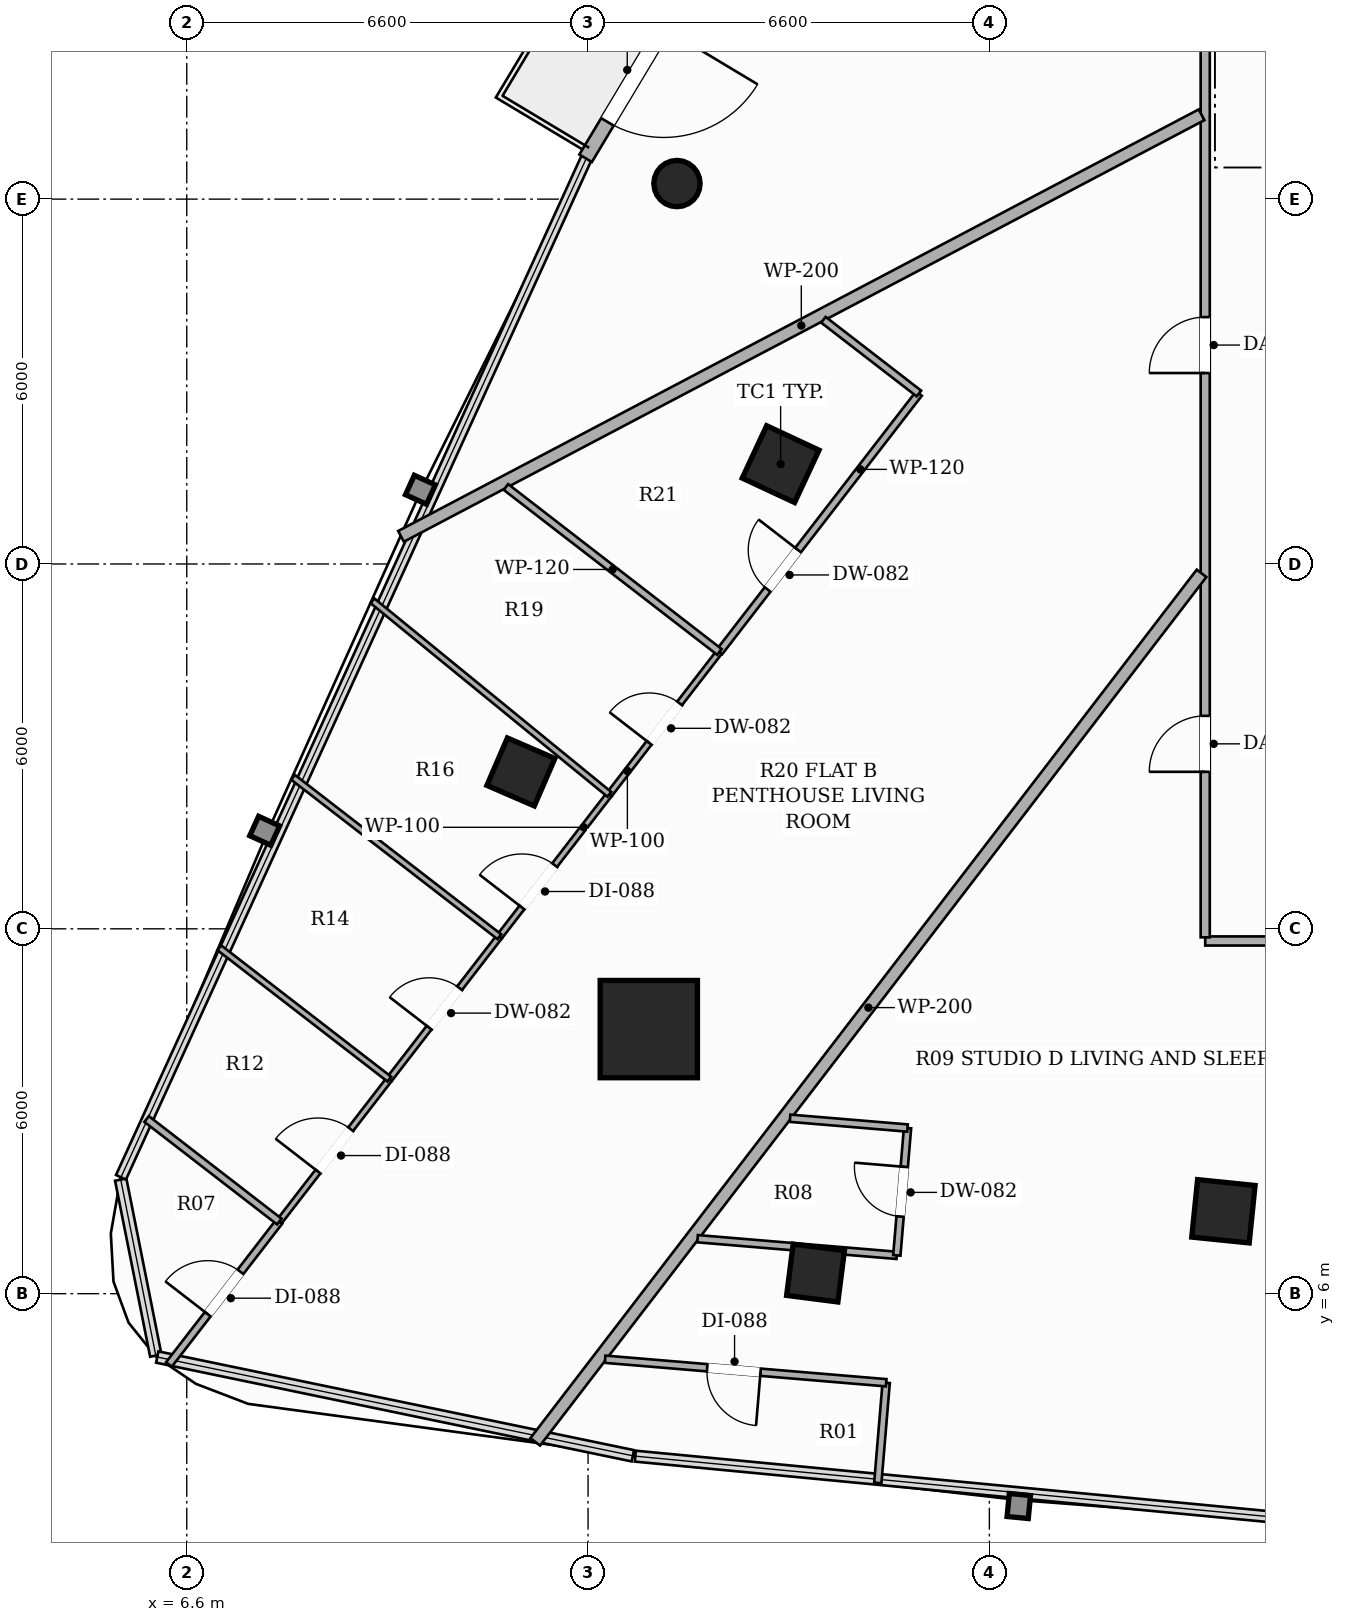
"""IFC4 building model, lengths in metres.
Left out: names, types, materials, properties, quantities, classifications, styles, units other than length and angle.
Written with IfcOpenShell. Run it as: python <this file> out.ifc"""

import sys

from ifc_helpers import new_model, si_unit, direction, frame, frame_2d, origin, origin_2d, place, context, subcontext, project, spatial, rectangle, hollow_rectangle, hollow_circle, extrude, element, fill, save


model = new_model("IFC4")
c1 = context("Model", 3, precision=1e-05, world=origin(), true_north=direction((0.0, 1.0)))
c2 = subcontext(c1, "Body", "Model", "MODEL_VIEW")
j1 = project(units=[si_unit("LENGTHUNIT", "METRE"), si_unit("PLANEANGLEUNIT", "RADIAN")], contexts=[c1])
p1 = place(None, origin())
s1 = spatial("IfcSite", under=j1, at=p1, CompositionType="ELEMENT")
p2 = place(p1, origin())
s2 = spatial("IfcBuilding", under=s1, at=p2, CompositionType="ELEMENT")
p3 = place(p2, frame((0.0, 0.0, 74.15)))
s3 = spatial("IfcBuildingStorey", under=s2, at=p3, CompositionType="ELEMENT", Elevation=74.15)
p4 = place(p3, frame((14.199, 10.351, 0.0), z_axis=(0.0, 0.0, 1.0), x_axis=(1.0, 0.0, 0.0)))
e1 = element("IfcColumn", 1, at=p4, inside=s3, PredefinedType="COLUMN", context=c2, shape_type="SweptSolid", body=[
    extrude(hollow_rectangle(XDim=1.6, YDim=1.6, WallThickness=0.05, at=origin_2d()), origin(), (0.0, 0.0, 1.0), 3.3),
])
for number, where, z_axis, x_axis in (
    (2, (16.367, 19.642, 0.0), (0.0, 0.0, 1.0), (0.423, 0.906, 0.0)),
    (3, (23.649, 7.355, 0.0), (0.0, 0.0, 1.0), (-0.995, 0.101, 0.0)),
):
    element("IfcColumn", number, at=place(p3, frame(where, z_axis=z_axis, x_axis=x_axis)), inside=s3, PredefinedType="COLUMN", context=c2, shape_type="SweptSolid", body=[
        extrude(hollow_rectangle(XDim=0.95, YDim=0.95, WallThickness=0.032, at=origin_2d()), origin(), (0.0, 0.0, 1.0), 3.3),
    ])
for number, where, z_axis, x_axis in (
    (4, (12.095, 14.58, 0.0), (0.0, 0.0, 1.0), (0.397, 0.918, 0.0)),
    (5, (16.941, 6.339, 0.0), (0.0, 0.0, 1.0), (-0.992, 0.127, 0.0)),
):
    element("IfcColumn", number, at=place(p3, frame(where, z_axis=z_axis, x_axis=x_axis)), inside=s3, PredefinedType="COLUMN", context=c2, shape_type="SweptSolid", body=[
        extrude(hollow_rectangle(XDim=0.85, YDim=0.85, WallThickness=0.028, at=origin_2d()), origin(), (0.0, 0.0, 1.0), 3.3),
    ])
p5 = place(p3, frame((14.662, 24.256, 0.0), z_axis=(0.0, 0.0, 1.0), x_axis=(1.0, 0.0, 0.0)))
e6 = element("IfcColumn", 6, at=p5, inside=s3, PredefinedType="COLUMN", context=c2, shape_type="SweptSolid", body=[
    extrude(hollow_circle(Radius=0.381, WallThickness=0.022, at=origin_2d()), origin(), (0.0, 0.0, 1.0), 3.3),
])
p6 = place(p3, frame((19.576, 35.37, 0.0), z_axis=(0.0, 0.0, 1.0), x_axis=(-0.514331693128, -0.85759134175, 0.0)))
e7 = element("IfcWall", 7, at=p6, inside=s3, PredefinedType="SOLIDWALL", context=c2, shape_type="SweptSolid", body=[
    extrude(rectangle(XDim=12.474, YDim=0.24, at=frame_2d((6.237, 0.0))), origin(), (0.0, 0.0, 1.0), 2.624),
])
p7 = place(p6, frame((9.977, 0.0, 0.0)))
e8 = element("IfcOpeningElement", 8, at=p7, cuts=e7, PredefinedType="OPENING", context=c2, shape_type="SweptSolid", body=[
    extrude(rectangle(XDim=1.8, YDim=2.2, at=frame_2d((0.9, 1.1))), frame((0.0, 0.13, 0.0), z_axis=(0.0, -1.0, 0.0), x_axis=(1.0, 0.0, 0.0)), (0.0, 0.0, 1.0), 0.26),
])
p8 = place(p3, frame((42.59, 11.8, 0.0), z_axis=(0.0, 0.0, 1.0), x_axis=(-1.0, 0.0, 0.0)))
e9 = element("IfcWall", 9, at=p8, inside=s3, PredefinedType="PARTITIONING", context=c2, shape_type="SweptSolid", body=[
    extrude(rectangle(XDim=19.24, YDim=0.15, at=frame_2d((9.62, 0.0))), origin(), (0.0, 0.0, 1.0), 2.669),
])
p9 = place(p8, frame((9.24, 0.0, 0.0)))
e10 = element("IfcOpeningElement", 10, at=p9, cuts=e9, PredefinedType="OPENING", context=c2, shape_type="SweptSolid", body=[
    extrude(rectangle(XDim=0.88, YDim=2.1, at=frame_2d((0.44, 1.05))), frame((0.0, 0.085, 0.0), z_axis=(0.0, -1.0, 0.0), x_axis=(1.0, 0.0, 0.0)), (0.0, 0.0, 1.0), 0.17),
])
p10 = place(p8, frame((2.174, 0.0, 0.0)))
e11 = element("IfcOpeningElement", 11, at=p10, cuts=e9, PredefinedType="OPENING", context=c2, shape_type="SweptSolid", body=[
    extrude(rectangle(XDim=0.88, YDim=2.1, at=frame_2d((0.44, 1.05))), frame((0.0, 0.085, 0.0), z_axis=(0.0, -1.0, 0.0), x_axis=(1.0, 0.0, 0.0)), (0.0, 0.0, 1.0), 0.17),
])
p11 = place(p3, frame((23.35, 11.86, 0.0), z_axis=(0.0, 0.0, 1.0), x_axis=(0.0, 1.0, 0.0)))
e12 = element("IfcWall", 12, at=p11, inside=s3, PredefinedType="PARTITIONING", context=c2, shape_type="SweptSolid", body=[
    extrude(rectangle(XDim=25.04, YDim=0.15, at=frame_2d((12.52, 0.0))), origin(), (0.0, 0.0, 1.0), 2.413),
])
p12 = place(p11, frame((18.695, 0.0, 0.0)))
e13 = element("IfcOpeningElement", 13, at=p12, cuts=e12, PredefinedType="OPENING", context=c2, shape_type="SweptSolid", body=[
    extrude(rectangle(XDim=0.88, YDim=2.1, at=frame_2d((0.44, 1.05))), frame((0.0, 0.085, 0.0), z_axis=(0.0, -1.0, 0.0), x_axis=(1.0, 0.0, 0.0)), (0.0, 0.0, 1.0), 0.17),
])
p13 = place(p11, frame((9.28, 0.0, 0.0)))
e14 = element("IfcOpeningElement", 14, at=p13, cuts=e12, PredefinedType="OPENING", context=c2, shape_type="SweptSolid", body=[
    extrude(rectangle(XDim=0.92, YDim=2.15, at=frame_2d((0.46, 1.075))), frame((0.0, 0.085, 0.0), z_axis=(0.0, -1.0, 0.0), x_axis=(1.0, 0.0, 0.0)), (0.0, 0.0, 1.0), 0.17),
])
p14 = place(p11, frame((2.722, 0.0, 0.0)))
e15 = element("IfcOpeningElement", 15, at=p14, cuts=e12, PredefinedType="OPENING", context=c2, shape_type="SweptSolid", body=[
    extrude(rectangle(XDim=0.92, YDim=2.15, at=frame_2d((0.46, 1.075))), frame((0.0, 0.085, 0.0), z_axis=(0.0, -1.0, 0.0), x_axis=(1.0, 0.0, 0.0)), (0.0, 0.0, 1.0), 0.17),
])
p15 = place(p3, frame((23.29, 25.387, 0.0), z_axis=(0.0, 0.0, 1.0), x_axis=(-0.884824599801, -0.465924272373, 0.0)))
e16 = element("IfcWall", 16, at=p15, inside=s3, PredefinedType="PARTITIONING", context=c2, shape_type="SweptSolid", body=[
    extrude(rectangle(XDim=14.88, YDim=0.2, at=frame_2d((7.44, 0.0))), origin(), (0.0, 0.0, 1.0), 2.413),
])
p16 = place(p3, frame((23.29, 17.846, 0.0), z_axis=(0.0, 0.0, 1.0), x_axis=(-0.608736412859, -0.793372535232, 0.0)))
e17 = element("IfcWall", 17, at=p16, inside=s3, PredefinedType="PARTITIONING", context=c2, shape_type="SweptSolid", body=[
    extrude(rectangle(XDim=18.003, YDim=0.2, at=frame_2d((9.001, 0.0))), origin(), (0.0, 0.0, 1.0), 2.413),
])
p17 = place(p3, frame((15.36, 16.554, 0.0), z_axis=(0.0, 0.0, 1.0), x_axis=(0.611289599194, 0.791406991324, 0.0)))
e18 = element("IfcWall", 18, at=p17, inside=s3, PredefinedType="PARTITIONING", context=c2, shape_type="SweptSolid", body=[
    extrude(rectangle(XDim=5.369, YDim=0.12, at=frame_2d((2.685, 0.0))), origin(), (0.0, 0.0, 1.0), 2.669),
])
p18 = place(p17, frame((1.297, 0.0, 0.0)))
e19 = element("IfcOpeningElement", 19, at=p18, cuts=e18, PredefinedType="OPENING", context=c2, shape_type="SweptSolid", body=[
    extrude(rectangle(XDim=0.82, YDim=2.1, at=frame_2d((0.41, 1.05))), frame((0.0, 0.07, 0.0), z_axis=(0.0, -1.0, 0.0), x_axis=(1.0, 0.0, 0.0)), (0.0, 0.0, 1.0), 0.14),
])
p19 = place(p3, frame((18.642, 20.803, 0.0), z_axis=(0.0, 0.0, 1.0), x_axis=(-0.791493240875, 0.611177919799, 0.0)))
e20 = element("IfcWall", 20, at=p19, inside=s3, PredefinedType="PARTITIONING", context=c2, shape_type="SweptSolid", body=[
    extrude(rectangle(XDim=1.985, YDim=0.12, at=frame_2d((0.992, 0.0))), origin(), (0.0, 0.0, 1.0), 2.669),
])
p20 = place(p3, frame((6.307, 4.836, 0.0), z_axis=(0.0, 0.0, 1.0), x_axis=(0.611279012709, 0.791415168304, 0.0)))
e21 = element("IfcWall", 21, at=p20, inside=s3, PredefinedType="PARTITIONING", context=c2, shape_type="SweptSolid", body=[
    extrude(rectangle(XDim=2.969, YDim=0.12, at=frame_2d((1.485, 0.0))), origin(), (0.0, 0.0, 1.0), 3.06),
])
p21 = place(p20, frame((1.045, 0.0, 0.0)))
e22 = element("IfcOpeningElement", 22, at=p21, cuts=e21, PredefinedType="OPENING", context=c2, shape_type="SweptSolid", body=[
    extrude(rectangle(XDim=0.88, YDim=2.1, at=frame_2d((0.44, 1.05))), frame((0.0, 0.07, 0.0), z_axis=(0.0, -1.0, 0.0), x_axis=(1.0, 0.0, 0.0)), (0.0, 0.0, 1.0), 0.14),
])
p22 = place(p3, frame((11.741, 11.87, 0.0), z_axis=(0.0, 0.0, 1.0), x_axis=(0.61134418085, 0.791364828976, 0.0)))
e23 = element("IfcWall", 23, at=p22, inside=s3, PredefinedType="PARTITIONING", context=c2, shape_type="SweptSolid", body=[
    extrude(rectangle(XDim=2.959, YDim=0.1, at=frame_2d((1.479, 0.0))), origin(), (0.0, 0.0, 1.0), 2.413),
])
p23 = place(p22, frame((0.608, 0.0, 0.0)))
e24 = element("IfcOpeningElement", 24, at=p23, cuts=e23, PredefinedType="OPENING", context=c2, shape_type="SweptSolid", body=[
    extrude(rectangle(XDim=0.88, YDim=2.1, at=frame_2d((0.44, 1.05))), frame((0.0, 0.06, 0.0), z_axis=(0.0, -1.0, 0.0), x_axis=(1.0, 0.0, 0.0)), (0.0, 0.0, 1.0), 0.12),
])
p24 = place(p3, frame((13.55, 14.212, 0.0), z_axis=(0.0, 0.0, 1.0), x_axis=(0.611510880037, 0.791236022686, 0.0)))
e25 = element("IfcWall", 25, at=p24, inside=s3, PredefinedType="PARTITIONING", context=c2, shape_type="SweptSolid", body=[
    extrude(rectangle(XDim=2.96, YDim=0.1, at=frame_2d((1.48, 0.0))), origin(), (0.0, 0.0, 1.0), 3.06),
])
p25 = place(p24, frame((1.07, 0.0, 0.0)))
e26 = element("IfcOpeningElement", 26, at=p25, cuts=e25, PredefinedType="OPENING", context=c2, shape_type="SweptSolid", body=[
    extrude(rectangle(XDim=0.82, YDim=2.1, at=frame_2d((0.41, 1.05))), frame((0.0, 0.06, 0.0), z_axis=(0.0, -1.0, 0.0), x_axis=(1.0, 0.0, 0.0)), (0.0, 0.0, 1.0), 0.12),
])
p26 = place(p3, frame((9.932, 9.528, 0.0), z_axis=(0.0, 0.0, 1.0), x_axis=(0.611304268233, 0.791395660615, 0.0)))
e27 = element("IfcWall", 27, at=p26, inside=s3, PredefinedType="PARTITIONING", context=c2, shape_type="SweptSolid", body=[
    extrude(rectangle(XDim=2.959, YDim=0.1, at=frame_2d((1.48, 0.0))), origin(), (0.0, 0.0, 1.0), 2.619),
])
p27 = place(p26, frame((1.07, 0.0, 0.0)))
e28 = element("IfcOpeningElement", 28, at=p27, cuts=e27, PredefinedType="OPENING", context=c2, shape_type="SweptSolid", body=[
    extrude(rectangle(XDim=0.82, YDim=2.1, at=frame_2d((0.41, 1.05))), frame((0.0, 0.06, 0.0), z_axis=(0.0, -1.0, 0.0), x_axis=(1.0, 0.0, 0.0)), (0.0, 0.0, 1.0), 0.12),
])
p28 = place(p3, frame((8.122, 7.186, 0.0), z_axis=(0.0, 0.0, 1.0), x_axis=(0.611459238808, 0.791275931187, 0.0)))
e29 = element("IfcWall", 29, at=p28, inside=s3, PredefinedType="PARTITIONING", context=c2, shape_type="SweptSolid", body=[
    extrude(rectangle(XDim=2.96, YDim=0.1, at=frame_2d((1.48, 0.0))), origin(), (0.0, 0.0, 1.0), 3.06),
])
p29 = place(p28, frame((1.04, 0.0, 0.0)))
e30 = element("IfcOpeningElement", 30, at=p29, cuts=e29, PredefinedType="OPENING", context=c2, shape_type="SweptSolid", body=[
    extrude(rectangle(XDim=0.88, YDim=2.1, at=frame_2d((0.44, 1.05))), frame((0.0, 0.06, 0.0), z_axis=(0.0, -1.0, 0.0), x_axis=(1.0, 0.0, 0.0)), (0.0, 0.0, 1.0), 0.12),
])
p30 = place(p3, frame((15.36, 16.554, 0.0), z_axis=(0.0, 0.0, 1.0), x_axis=(-0.79138059941, 0.611323766, 0.0)))
e31 = element("IfcWall", 31, at=p30, inside=s3, PredefinedType="PARTITIONING", context=c2, shape_type="SweptSolid", body=[
    extrude(rectangle(XDim=4.437, YDim=0.12, at=frame_2d((2.218, 0.0))), origin(), (0.0, 0.0, 1.0), 2.413),
])
p31 = place(p3, frame((5.94, 8.872, 0.0), z_axis=(0.0, 0.0, 1.0), x_axis=(0.791312259297, -0.611412224514, 0.0)))
e32 = element("IfcWall", 32, at=p31, inside=s3, PredefinedType="PARTITIONING", context=c2, shape_type="SweptSolid", body=[
    extrude(rectangle(XDim=2.758, YDim=0.12, at=frame_2d((1.379, 0.0))), origin(), (0.0, 0.0, 1.0), 3.06),
])
p32 = place(p3, frame((9.654, 17.394, 0.0), z_axis=(0.0, 0.0, 1.0), x_axis=(0.774493289837, -0.63258212431, 0.0)))
e33 = element("IfcWall", 33, at=p32, inside=s3, PredefinedType="PARTITIONING", context=c2, shape_type="SweptSolid", body=[
    extrude(rectangle(XDim=5.03, YDim=0.1, at=frame_2d((2.515, 0.0))), origin(), (0.0, 0.0, 1.0), 2.413),
])
p33 = place(p3, frame((11.741, 11.87, 0.0), z_axis=(0.0, 0.0, 1.0), x_axis=(-0.791298779838, 0.61142966973, 0.0)))
e34 = element("IfcWall", 34, at=p33, inside=s3, PredefinedType="PARTITIONING", context=c2, shape_type="SweptSolid", body=[
    extrude(rectangle(XDim=4.286, YDim=0.1, at=frame_2d((2.143, 0.0))), origin(), (0.0, 0.0, 1.0), 3.06),
])
p34 = place(p3, frame((9.932, 9.528, 0.0), z_axis=(0.0, 0.0, 1.0), x_axis=(-0.791360981132, 0.611349161725, 0.0)))
e35 = element("IfcWall", 35, at=p34, inside=s3, PredefinedType="PARTITIONING", context=c2, shape_type="SweptSolid", body=[
    extrude(rectangle(XDim=3.533, YDim=0.1, at=frame_2d((1.767, 0.0))), origin(), (0.0, 0.0, 1.0), 3.06),
])
p35 = place(p3, frame((15.001, 6.904, 0.0), z_axis=(0.0, 0.0, 1.0), x_axis=(0.996518569178, -0.083371105803, 0.0)))
e36 = element("IfcWall", 36, at=p35, inside=s3, PredefinedType="PARTITIONING", context=c2, shape_type="SweptSolid", body=[
    extrude(rectangle(XDim=3.289, YDim=0.12, at=frame_2d((1.644, 0.0))), origin(), (0.0, 0.0, 1.0), 2.413),
])
p36 = place(p3, frame((18.278, 6.63, 0.0), z_axis=(0.0, 0.0, 1.0), x_axis=(0.083756885487, 0.996486218737, 0.0)))
e37 = element("IfcWall", 37, at=p36, inside=s3, PredefinedType="PARTITIONING", context=c2, shape_type="SweptSolid", body=[
    extrude(rectangle(XDim=2.102, YDim=0.12, at=frame_2d((1.051, 0.0))), origin(), (0.0, 0.0, 1.0), 2.413),
])
p37 = place(p36, frame((0.641, 0.0, 0.0)))
e38 = element("IfcOpeningElement", 38, at=p37, cuts=e37, PredefinedType="OPENING", context=c2, shape_type="SweptSolid", body=[
    extrude(rectangle(XDim=0.82, YDim=2.1, at=frame_2d((0.41, 1.05))), frame((0.0, 0.07, 0.0), z_axis=(0.0, -1.0, 0.0), x_axis=(1.0, 0.0, 0.0)), (0.0, 0.0, 1.0), 0.14),
])
p38 = place(p3, frame((18.454, 8.724, 0.0), z_axis=(0.0, 0.0, 1.0), x_axis=(-0.996550966871, 0.082982952637, 0.0)))
e39 = element("IfcWall", 39, at=p38, inside=s3, PredefinedType="PARTITIONING", context=c2, shape_type="SweptSolid", body=[
    extrude(rectangle(XDim=1.939, YDim=0.12, at=frame_2d((0.969, 0.0))), origin(), (0.0, 0.0, 1.0), 2.669),
])
p39 = place(p3, frame((17.965, 2.887, 0.0), z_axis=(0.0, 0.0, 1.0), x_axis=(0.083412008543, 0.996515146313, 0.0)))
e40 = element("IfcWall", 40, at=p39, inside=s3, PredefinedType="PARTITIONING", context=c2, shape_type="SweptSolid", body=[
    extrude(rectangle(XDim=1.654, YDim=0.12, at=frame_2d((0.827, 0.0))), origin(), (0.0, 0.0, 1.0), 2.619),
])
p40 = place(p3, frame((18.103, 4.535, 0.0), z_axis=(0.0, 0.0, 1.0), x_axis=(-0.99650936218, 0.083481082211, 0.0)))
e41 = element("IfcWall", 41, at=p40, inside=s3, PredefinedType="PARTITIONING", context=c2, shape_type="SweptSolid", body=[
    extrude(rectangle(XDim=4.638, YDim=0.12, at=frame_2d((2.319, 0.0))), origin(), (0.0, 0.0, 1.0), 2.619),
])
p41 = place(p40, frame((2.074, 0.0, 0.0)))
e42 = element("IfcOpeningElement", 42, at=p41, cuts=e41, PredefinedType="OPENING", context=c2, shape_type="SweptSolid", body=[
    extrude(rectangle(XDim=0.88, YDim=2.1, at=frame_2d((0.44, 1.05))), frame((0.0, 0.07, 0.0), z_axis=(0.0, -1.0, 0.0), x_axis=(1.0, 0.0, 0.0)), (0.0, 0.0, 1.0), 0.14),
])
p42 = place(p7, origin())
e43 = element("IfcDoor", 43, at=p42, inside=s3, OperationType="SINGLE_SWING_LEFT", PredefinedType="DOOR", context=c2, shape_type="SweptSolid", body=[
    extrude(rectangle(XDim=1.8, YDim=2.2, at=frame_2d((0.9, 1.1))), frame((0.0, 0.025, 0.0), z_axis=(0.0, -1.0, 0.0), x_axis=(1.0, 0.0, 0.0)), (0.0, 0.0, 1.0), 0.05),
])
fill(e8, e43)
p43 = place(p13, origin())
e44 = element("IfcDoor", 44, at=p43, inside=s3, OperationType="SINGLE_SWING_LEFT", PredefinedType="DOOR", context=c2, shape_type="SweptSolid", body=[
    extrude(rectangle(XDim=0.92, YDim=2.15, at=frame_2d((0.46, 1.075))), frame((0.0, 0.025, 0.0), z_axis=(0.0, -1.0, 0.0), x_axis=(1.0, 0.0, 0.0)), (0.0, 0.0, 1.0), 0.05),
])
fill(e14, e44)
p44 = place(p18, origin())
e45 = element("IfcDoor", 45, at=p44, inside=s3, OperationType="SINGLE_SWING_RIGHT", PredefinedType="DOOR", context=c2, shape_type="SweptSolid", body=[
    extrude(rectangle(XDim=0.82, YDim=2.1, at=frame_2d((0.41, 1.05))), frame((0.0, 0.025, 0.0), z_axis=(0.0, -1.0, 0.0), x_axis=(1.0, 0.0, 0.0)), (0.0, 0.0, 1.0), 0.05),
])
fill(e19, e45)
p45 = place(p21, origin())
e46 = element("IfcDoor", 46, at=p45, inside=s3, OperationType="SINGLE_SWING_LEFT", PredefinedType="DOOR", context=c2, shape_type="SweptSolid", body=[
    extrude(rectangle(XDim=0.88, YDim=2.1, at=frame_2d((0.44, 1.05))), frame((0.0, 0.025, 0.0), z_axis=(0.0, -1.0, 0.0), x_axis=(1.0, 0.0, 0.0)), (0.0, 0.0, 1.0), 0.05),
])
fill(e22, e46)
p46 = place(p23, origin())
e47 = element("IfcDoor", 47, at=p46, inside=s3, OperationType="SINGLE_SWING_LEFT", PredefinedType="DOOR", context=c2, shape_type="SweptSolid", body=[
    extrude(rectangle(XDim=0.88, YDim=2.1, at=frame_2d((0.44, 1.05))), frame((0.0, 0.025, 0.0), z_axis=(0.0, -1.0, 0.0), x_axis=(1.0, 0.0, 0.0)), (0.0, 0.0, 1.0), 0.05),
])
fill(e24, e47)
p47 = place(p25, origin())
e48 = element("IfcDoor", 48, at=p47, inside=s3, OperationType="SINGLE_SWING_LEFT", PredefinedType="DOOR", context=c2, shape_type="SweptSolid", body=[
    extrude(rectangle(XDim=0.82, YDim=2.1, at=frame_2d((0.41, 1.05))), frame((0.0, 0.025, 0.0), z_axis=(0.0, -1.0, 0.0), x_axis=(1.0, 0.0, 0.0)), (0.0, 0.0, 1.0), 0.05),
])
fill(e26, e48)
p48 = place(p27, origin())
e49 = element("IfcDoor", 49, at=p48, inside=s3, OperationType="SINGLE_SWING_LEFT", PredefinedType="DOOR", context=c2, shape_type="SweptSolid", body=[
    extrude(rectangle(XDim=0.82, YDim=2.1, at=frame_2d((0.41, 1.05))), frame((0.0, 0.025, 0.0), z_axis=(0.0, -1.0, 0.0), x_axis=(1.0, 0.0, 0.0)), (0.0, 0.0, 1.0), 0.05),
])
fill(e28, e49)
p49 = place(p29, origin())
e50 = element("IfcDoor", 50, at=p49, inside=s3, OperationType="SINGLE_SWING_LEFT", PredefinedType="DOOR", context=c2, shape_type="SweptSolid", body=[
    extrude(rectangle(XDim=0.88, YDim=2.1, at=frame_2d((0.44, 1.05))), frame((0.0, 0.025, 0.0), z_axis=(0.0, -1.0, 0.0), x_axis=(1.0, 0.0, 0.0)), (0.0, 0.0, 1.0), 0.05),
])
fill(e30, e50)
p50 = place(p14, origin())
e51 = element("IfcDoor", 51, at=p50, inside=s3, OperationType="SINGLE_SWING_LEFT", PredefinedType="DOOR", context=c2, shape_type="SweptSolid", body=[
    extrude(rectangle(XDim=0.92, YDim=2.15, at=frame_2d((0.46, 1.075))), frame((0.0, 0.025, 0.0), z_axis=(0.0, -1.0, 0.0), x_axis=(1.0, 0.0, 0.0)), (0.0, 0.0, 1.0), 0.05),
])
fill(e15, e51)
p51 = place(p37, origin())
e52 = element("IfcDoor", 52, at=p51, inside=s3, OperationType="SINGLE_SWING_RIGHT", PredefinedType="DOOR", context=c2, shape_type="SweptSolid", body=[
    extrude(rectangle(XDim=0.82, YDim=2.1, at=frame_2d((0.41, 1.05))), frame((0.0, 0.025, 0.0), z_axis=(0.0, -1.0, 0.0), x_axis=(1.0, 0.0, 0.0)), (0.0, 0.0, 1.0), 0.05),
])
fill(e38, e52)
p52 = place(p41, origin())
e53 = element("IfcDoor", 53, at=p52, inside=s3, OperationType="SINGLE_SWING_LEFT", PredefinedType="DOOR", context=c2, shape_type="SweptSolid", body=[
    extrude(rectangle(XDim=0.88, YDim=2.1, at=frame_2d((0.44, 1.05))), frame((0.0, 0.025, 0.0), z_axis=(0.0, -1.0, 0.0), x_axis=(1.0, 0.0, 0.0)), (0.0, 0.0, 1.0), 0.05),
])
fill(e42, e53)
save(model, sys.argv[1])
